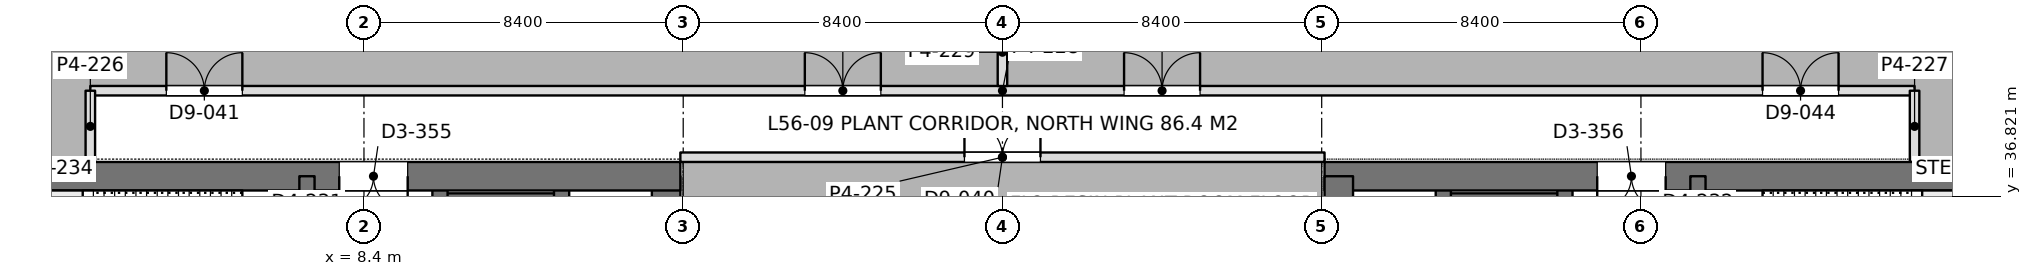
"""IFC4 building model, lengths in metres.
Left out: names, types, materials, properties, quantities, classifications, styles, units other than length and angle.
Written with IfcOpenShell. Run it as: python <this file> out.ifc"""

import sys

from ifc_helpers import new_model, si_unit, direction, frame, frame_2d, origin, place, context, subcontext, project, spatial, rectangle, extrude, element, fill, save


model = new_model("IFC4")
c1 = context("Model", 3, precision=1e-05, world=origin(), true_north=direction((0.0, 1.0)))
c2 = subcontext(c1, "Body", "Model", "MODEL_VIEW")
j1 = project(units=[si_unit("LENGTHUNIT", "METRE"), si_unit("PLANEANGLEUNIT", "RADIAN")], contexts=[c1])
p1 = place(None, origin())
s1 = spatial("IfcSite", under=j1, at=p1, CompositionType="ELEMENT")
p2 = place(p1, origin())
s2 = spatial("IfcBuilding", under=s1, at=p2, CompositionType="ELEMENT")
p3 = place(p2, frame((0.0, 0.0, 244.8)))
s3 = spatial("IfcBuildingStorey", under=s2, at=p3, CompositionType="ELEMENT", Elevation=244.8)
p4 = place(p3, frame((-1.125, 37.35, 0.0), z_axis=(0.0, 0.0, 1.0), x_axis=(1.0, 0.0, 0.0)))
e1 = element("IfcWall", 1, at=p4, inside=s3, PredefinedType="SHEAR", context=c2, shape_type="SweptSolid", body=[
    extrude(rectangle(XDim=17.85, YDim=0.75, at=frame_2d((8.925, 0.0))), origin(), (0.0, 0.0, 1.0), 5.4),
])
p5 = place(p4, frame((8.875, 0.0, 0.0)))
e2 = element("IfcOpeningElement", 2, at=p5, cuts=e1, PredefinedType="OPENING", context=c2, shape_type="SweptSolid", body=[
    extrude(rectangle(XDim=1.8, YDim=2.4, at=frame_2d((0.9, 1.2))), frame((0.0, 0.385, 0.0), z_axis=(0.0, -1.0, 0.0), x_axis=(1.0, 0.0, 0.0)), (0.0, 0.0, 1.0), 0.77),
])
p6 = place(p3, frame((16.35, 27.8, 0.0), z_axis=(0.0, 0.0, 1.0), x_axis=(0.0, 1.0, 0.0)))
e3 = element("IfcWall", 3, at=p6, inside=s3, PredefinedType="SHEAR", context=c2, shape_type="SweptSolid", body=[
    extrude(rectangle(XDim=9.55, YDim=0.75, at=frame_2d((4.775, 0.0))), origin(), (0.0, 0.0, 1.0), 5.4),
])
p7 = place(p3, frame((6.9, 13.05, 0.0), z_axis=(0.0, 0.0, 1.0), x_axis=(0.0, 1.0, 0.0)))
e4 = element("IfcWall", 4, at=p7, inside=s3, PredefinedType="SHEAR", context=c2, shape_type="SweptSolid", body=[
    extrude(rectangle(XDim=24.3, YDim=0.4, at=frame_2d((12.15, 0.0))), origin(), (0.0, 0.0, 1.0), 5.4),
])
p8 = place(p7, frame((1.3, 0.0, 0.0)))
e5 = element("IfcOpeningElement", 5, at=p8, cuts=e4, PredefinedType="OPENING", context=c2, shape_type="SweptSolid", body=[
    extrude(rectangle(XDim=1.0, YDim=2.2, at=frame_2d((0.5, 1.1))), frame((0.0, 0.21, 0.0), z_axis=(0.0, -1.0, 0.0), x_axis=(1.0, 0.0, 0.0)), (0.0, 0.0, 1.0), 0.42),
])
p9 = place(p7, frame((22.0, 0.0, 0.0)))
e6 = element("IfcOpeningElement", 6, at=p9, cuts=e4, PredefinedType="OPENING", context=c2, shape_type="SweptSolid", body=[
    extrude(rectangle(XDim=1.0, YDim=2.2, at=frame_2d((0.5, 1.1))), frame((0.0, 0.21, 0.0), z_axis=(0.0, -1.0, 0.0), x_axis=(1.0, 0.0, 0.0)), (0.0, 0.0, 1.0), 0.42),
])
p10 = place(p7, frame((5.55, 0.0, 0.0)))
e7 = element("IfcOpeningElement", 7, at=p10, cuts=e4, PredefinedType="OPENING", context=c2, shape_type="SweptSolid", body=[
    extrude(rectangle(XDim=1.0, YDim=2.2, at=frame_2d((0.5, 1.1))), frame((0.0, 0.21, 0.0), z_axis=(0.0, -1.0, 0.0), x_axis=(1.0, 0.0, 0.0)), (0.0, 0.0, 1.0), 0.42),
])
p11 = place(p7, frame((9.55, 0.0, 0.0)))
e8 = element("IfcOpeningElement", 8, at=p11, cuts=e4, PredefinedType="OPENING", context=c2, shape_type="SweptSolid", body=[
    extrude(rectangle(XDim=1.0, YDim=2.2, at=frame_2d((0.5, 1.1))), frame((0.0, 0.21, 0.0), z_axis=(0.0, -1.0, 0.0), x_axis=(1.0, 0.0, 0.0)), (0.0, 0.0, 1.0), 0.42),
])
p12 = place(p7, frame((12.8, 0.0, 0.0)))
e9 = element("IfcOpeningElement", 9, at=p12, cuts=e4, PredefinedType="OPENING", context=c2, shape_type="SweptSolid", body=[
    extrude(rectangle(XDim=1.1, YDim=2.2, at=frame_2d((0.55, 1.1))), frame((0.0, 0.21, 0.0), z_axis=(0.0, -1.0, 0.0), x_axis=(1.0, 0.0, 0.0)), (0.0, 0.0, 1.0), 0.42),
])
p13 = place(p7, frame((15.538, 0.0, 0.0)))
e10 = element("IfcOpeningElement", 10, at=p13, cuts=e4, PredefinedType="OPENING", context=c2, shape_type="SweptSolid", body=[
    extrude(rectangle(XDim=1.1, YDim=2.2, at=frame_2d((0.55, 1.1))), frame((0.0, 0.21, 0.0), z_axis=(0.0, -1.0, 0.0), x_axis=(1.0, 0.0, 0.0)), (0.0, 0.0, 1.0), 0.42),
])
p14 = place(p7, frame((18.262, 0.0, 0.0)))
e11 = element("IfcOpeningElement", 11, at=p14, cuts=e4, PredefinedType="OPENING", context=c2, shape_type="SweptSolid", body=[
    extrude(rectangle(XDim=1.1, YDim=2.2, at=frame_2d((0.55, 1.1))), frame((0.0, 0.21, 0.0), z_axis=(0.0, -1.0, 0.0), x_axis=(1.0, 0.0, 0.0)), (0.0, 0.0, 1.0), 0.42),
])
p15 = place(p3, frame((10.4, 13.05, 0.0), z_axis=(0.0, 0.0, 1.0), x_axis=(0.0, 1.0, 0.0)))
e12 = element("IfcWall", 12, at=p15, inside=s3, PredefinedType="SHEAR", context=c2, shape_type="SweptSolid", body=[
    extrude(rectangle(XDim=24.3, YDim=0.4, at=frame_2d((12.15, 0.0))), origin(), (0.0, 0.0, 1.0), 5.4),
])
p16 = place(p15, frame((15.75, 0.0, 0.0)))
e13 = element("IfcOpeningElement", 13, at=p16, cuts=e12, PredefinedType="OPENING", context=c2, shape_type="SweptSolid", body=[
    extrude(rectangle(XDim=1.1, YDim=2.2, at=frame_2d((0.55, 1.1))), frame((0.0, 0.21, 0.0), z_axis=(0.0, -1.0, 0.0), x_axis=(1.0, 0.0, 0.0)), (0.0, 0.0, 1.0), 0.42),
])
p17 = place(p15, frame((18.6, 0.0, 0.0)))
e14 = element("IfcOpeningElement", 14, at=p17, cuts=e12, PredefinedType="OPENING", context=c2, shape_type="SweptSolid", body=[
    extrude(rectangle(XDim=1.1, YDim=2.2, at=frame_2d((0.55, 1.1))), frame((0.0, 0.21, 0.0), z_axis=(0.0, -1.0, 0.0), x_axis=(1.0, 0.0, 0.0)), (0.0, 0.0, 1.0), 0.42),
])
p18 = place(p15, frame((21.45, 0.0, 0.0)))
e15 = element("IfcOpeningElement", 15, at=p18, cuts=e12, PredefinedType="OPENING", context=c2, shape_type="SweptSolid", body=[
    extrude(rectangle(XDim=1.1, YDim=2.2, at=frame_2d((0.55, 1.1))), frame((0.0, 0.21, 0.0), z_axis=(0.0, -1.0, 0.0), x_axis=(1.0, 0.0, 0.0)), (0.0, 0.0, 1.0), 0.42),
])
p19 = place(p15, frame((8.65, 0.0, 0.0)))
e16 = element("IfcOpeningElement", 16, at=p19, cuts=e12, PredefinedType="OPENING", context=c2, shape_type="SweptSolid", body=[
    extrude(rectangle(XDim=1.8, YDim=2.4, at=frame_2d((0.9, 1.2))), frame((0.0, 0.21, 0.0), z_axis=(0.0, -1.0, 0.0), x_axis=(1.0, 0.0, 0.0)), (0.0, 0.0, 1.0), 0.42),
])
p20 = place(p15, frame((1.05, 0.0, 0.0)))
e17 = element("IfcOpeningElement", 17, at=p20, cuts=e12, PredefinedType="OPENING", context=c2, shape_type="SweptSolid", body=[
    extrude(rectangle(XDim=1.8, YDim=2.4, at=frame_2d((0.9, 1.2))), frame((0.0, 0.21, 0.0), z_axis=(0.0, -1.0, 0.0), x_axis=(1.0, 0.0, 0.0)), (0.0, 0.0, 1.0), 0.42),
])
p21 = place(p3, frame((13.6, 27.925, 0.0), z_axis=(0.0, 0.0, 1.0), x_axis=(0.0, 1.0, 0.0)))
e18 = element("IfcWall", 18, at=p21, inside=s3, PredefinedType="SHEAR", context=c2, shape_type="SweptSolid", body=[
    extrude(rectangle(XDim=9.425, YDim=0.4, at=frame_2d((4.712, 0.0))), origin(), (0.0, 0.0, 1.0), 5.4),
])
p22 = place(p3, frame((10.4, 36.625, 0.0), z_axis=(0.0, 0.0, 1.0), x_axis=(1.0, 0.0, 0.0)))
e19 = element("IfcWall", 19, at=p22, inside=s3, PredefinedType="SHEAR", context=c2, shape_type="SweptSolid", body=[
    extrude(rectangle(XDim=3.2, YDim=0.55, at=frame_2d((1.6, 0.0))), origin(), (0.0, 0.0, 1.0), 5.4),
])
p23 = place(p3, frame((33.675, 37.35, 0.0), z_axis=(0.0, 0.0, 1.0), x_axis=(1.0, 0.0, 0.0)))
e20 = element("IfcWall", 20, at=p23, inside=s3, PredefinedType="SHEAR", context=c2, shape_type="SweptSolid", body=[
    extrude(rectangle(XDim=17.85, YDim=0.75, at=frame_2d((8.925, 0.0))), origin(), (0.0, 0.0, 1.0), 5.4),
])
p24 = place(p23, frame((7.175, 0.0, 0.0)))
e21 = element("IfcOpeningElement", 21, at=p24, cuts=e20, PredefinedType="OPENING", context=c2, shape_type="SweptSolid", body=[
    extrude(rectangle(XDim=1.8, YDim=2.4, at=frame_2d((0.9, 1.2))), frame((0.0, 0.385, 0.0), z_axis=(0.0, -1.0, 0.0), x_axis=(1.0, 0.0, 0.0)), (0.0, 0.0, 1.0), 0.77),
])
p25 = place(p3, frame((34.05, 27.8, 0.0), z_axis=(0.0, 0.0, 1.0), x_axis=(0.0, 1.0, 0.0)))
e22 = element("IfcWall", 22, at=p25, inside=s3, PredefinedType="SHEAR", context=c2, shape_type="SweptSolid", body=[
    extrude(rectangle(XDim=9.55, YDim=0.75, at=frame_2d((4.775, 0.0))), origin(), (0.0, 0.0, 1.0), 5.4),
])
p26 = place(p3, frame((43.5, 13.05, 0.0), z_axis=(0.0, 0.0, 1.0), x_axis=(0.0, 1.0, 0.0)))
e23 = element("IfcWall", 23, at=p26, inside=s3, PredefinedType="SHEAR", context=c2, shape_type="SweptSolid", body=[
    extrude(rectangle(XDim=24.3, YDim=0.4, at=frame_2d((12.15, 0.0))), origin(), (0.0, 0.0, 1.0), 5.4),
])
p27 = place(p26, frame((1.3, 0.0, 0.0)))
e24 = element("IfcOpeningElement", 24, at=p27, cuts=e23, PredefinedType="OPENING", context=c2, shape_type="SweptSolid", body=[
    extrude(rectangle(XDim=1.0, YDim=2.2, at=frame_2d((0.5, 1.1))), frame((0.0, 0.21, 0.0), z_axis=(0.0, -1.0, 0.0), x_axis=(1.0, 0.0, 0.0)), (0.0, 0.0, 1.0), 0.42),
])
p28 = place(p26, frame((22.0, 0.0, 0.0)))
e25 = element("IfcOpeningElement", 25, at=p28, cuts=e23, PredefinedType="OPENING", context=c2, shape_type="SweptSolid", body=[
    extrude(rectangle(XDim=1.0, YDim=2.2, at=frame_2d((0.5, 1.1))), frame((0.0, 0.21, 0.0), z_axis=(0.0, -1.0, 0.0), x_axis=(1.0, 0.0, 0.0)), (0.0, 0.0, 1.0), 0.42),
])
p29 = place(p26, frame((5.55, 0.0, 0.0)))
e26 = element("IfcOpeningElement", 26, at=p29, cuts=e23, PredefinedType="OPENING", context=c2, shape_type="SweptSolid", body=[
    extrude(rectangle(XDim=1.0, YDim=2.2, at=frame_2d((0.5, 1.1))), frame((0.0, 0.21, 0.0), z_axis=(0.0, -1.0, 0.0), x_axis=(1.0, 0.0, 0.0)), (0.0, 0.0, 1.0), 0.42),
])
p30 = place(p26, frame((9.55, 0.0, 0.0)))
e27 = element("IfcOpeningElement", 27, at=p30, cuts=e23, PredefinedType="OPENING", context=c2, shape_type="SweptSolid", body=[
    extrude(rectangle(XDim=1.0, YDim=2.2, at=frame_2d((0.5, 1.1))), frame((0.0, 0.21, 0.0), z_axis=(0.0, -1.0, 0.0), x_axis=(1.0, 0.0, 0.0)), (0.0, 0.0, 1.0), 0.42),
])
p31 = place(p26, frame((12.8, 0.0, 0.0)))
e28 = element("IfcOpeningElement", 28, at=p31, cuts=e23, PredefinedType="OPENING", context=c2, shape_type="SweptSolid", body=[
    extrude(rectangle(XDim=1.1, YDim=2.2, at=frame_2d((0.55, 1.1))), frame((0.0, 0.21, 0.0), z_axis=(0.0, -1.0, 0.0), x_axis=(1.0, 0.0, 0.0)), (0.0, 0.0, 1.0), 0.42),
])
p32 = place(p26, frame((15.538, 0.0, 0.0)))
e29 = element("IfcOpeningElement", 29, at=p32, cuts=e23, PredefinedType="OPENING", context=c2, shape_type="SweptSolid", body=[
    extrude(rectangle(XDim=1.1, YDim=2.2, at=frame_2d((0.55, 1.1))), frame((0.0, 0.21, 0.0), z_axis=(0.0, -1.0, 0.0), x_axis=(1.0, 0.0, 0.0)), (0.0, 0.0, 1.0), 0.42),
])
p33 = place(p26, frame((18.262, 0.0, 0.0)))
e30 = element("IfcOpeningElement", 30, at=p33, cuts=e23, PredefinedType="OPENING", context=c2, shape_type="SweptSolid", body=[
    extrude(rectangle(XDim=1.1, YDim=2.2, at=frame_2d((0.55, 1.1))), frame((0.0, 0.21, 0.0), z_axis=(0.0, -1.0, 0.0), x_axis=(1.0, 0.0, 0.0)), (0.0, 0.0, 1.0), 0.42),
])
p34 = place(p3, frame((40.0, 13.05, 0.0), z_axis=(0.0, 0.0, 1.0), x_axis=(0.0, 1.0, 0.0)))
e31 = element("IfcWall", 31, at=p34, inside=s3, PredefinedType="SHEAR", context=c2, shape_type="SweptSolid", body=[
    extrude(rectangle(XDim=24.3, YDim=0.4, at=frame_2d((12.15, 0.0))), origin(), (0.0, 0.0, 1.0), 5.4),
])
p35 = place(p34, frame((15.75, 0.0, 0.0)))
e32 = element("IfcOpeningElement", 32, at=p35, cuts=e31, PredefinedType="OPENING", context=c2, shape_type="SweptSolid", body=[
    extrude(rectangle(XDim=1.1, YDim=2.2, at=frame_2d((0.55, 1.1))), frame((0.0, 0.21, 0.0), z_axis=(0.0, -1.0, 0.0), x_axis=(1.0, 0.0, 0.0)), (0.0, 0.0, 1.0), 0.42),
])
p36 = place(p34, frame((18.6, 0.0, 0.0)))
e33 = element("IfcOpeningElement", 33, at=p36, cuts=e31, PredefinedType="OPENING", context=c2, shape_type="SweptSolid", body=[
    extrude(rectangle(XDim=1.1, YDim=2.2, at=frame_2d((0.55, 1.1))), frame((0.0, 0.21, 0.0), z_axis=(0.0, -1.0, 0.0), x_axis=(1.0, 0.0, 0.0)), (0.0, 0.0, 1.0), 0.42),
])
p37 = place(p34, frame((21.45, 0.0, 0.0)))
e34 = element("IfcOpeningElement", 34, at=p37, cuts=e31, PredefinedType="OPENING", context=c2, shape_type="SweptSolid", body=[
    extrude(rectangle(XDim=1.1, YDim=2.2, at=frame_2d((0.55, 1.1))), frame((0.0, 0.21, 0.0), z_axis=(0.0, -1.0, 0.0), x_axis=(1.0, 0.0, 0.0)), (0.0, 0.0, 1.0), 0.42),
])
p38 = place(p34, frame((8.65, 0.0, 0.0)))
e35 = element("IfcOpeningElement", 35, at=p38, cuts=e31, PredefinedType="OPENING", context=c2, shape_type="SweptSolid", body=[
    extrude(rectangle(XDim=1.8, YDim=2.4, at=frame_2d((0.9, 1.2))), frame((0.0, 0.21, 0.0), z_axis=(0.0, -1.0, 0.0), x_axis=(1.0, 0.0, 0.0)), (0.0, 0.0, 1.0), 0.42),
])
p39 = place(p34, frame((1.05, 0.0, 0.0)))
e36 = element("IfcOpeningElement", 36, at=p39, cuts=e31, PredefinedType="OPENING", context=c2, shape_type="SweptSolid", body=[
    extrude(rectangle(XDim=1.8, YDim=2.4, at=frame_2d((0.9, 1.2))), frame((0.0, 0.21, 0.0), z_axis=(0.0, -1.0, 0.0), x_axis=(1.0, 0.0, 0.0)), (0.0, 0.0, 1.0), 0.42),
])
p40 = place(p3, frame((36.8, 27.925, 0.0), z_axis=(0.0, 0.0, 1.0), x_axis=(0.0, 1.0, 0.0)))
e37 = element("IfcWall", 37, at=p40, inside=s3, PredefinedType="SHEAR", context=c2, shape_type="SweptSolid", body=[
    extrude(rectangle(XDim=9.425, YDim=0.4, at=frame_2d((4.712, 0.0))), origin(), (0.0, 0.0, 1.0), 5.4),
])
p41 = place(p3, frame((40.0, 36.625, 0.0), z_axis=(0.0, 0.0, 1.0), x_axis=(-1.0, 0.0, 0.0)))
e38 = element("IfcWall", 38, at=p41, inside=s3, PredefinedType="SHEAR", context=c2, shape_type="SweptSolid", body=[
    extrude(rectangle(XDim=3.2, YDim=0.55, at=frame_2d((1.6, 0.0))), origin(), (0.0, 0.0, 1.0), 5.4),
])
p42 = place(p3, frame((1.2, 39.6, 0.0), z_axis=(0.0, 0.0, 1.0), x_axis=(1.0, 0.0, 0.0)))
e39 = element("IfcWall", 39, at=p42, inside=s3, PredefinedType="PARTITIONING", context=c2, shape_type="SweptSolid", body=[
    extrude(rectangle(XDim=48.0, YDim=0.25, at=frame_2d((24.0, 0.0))), origin(), (0.0, 0.0, 1.0), 4.7),
])
p43 = place(p42, frame((2.0, 0.0, 0.0)))
e40 = element("IfcOpeningElement", 40, at=p43, cuts=e39, PredefinedType="OPENING", context=c2, shape_type="SweptSolid", body=[
    extrude(rectangle(XDim=2.0, YDim=2.4, at=frame_2d((1.0, 1.2))), frame((0.0, 0.135, 0.0), z_axis=(0.0, -1.0, 0.0), x_axis=(1.0, 0.0, 0.0)), (0.0, 0.0, 1.0), 0.27),
])
p44 = place(p42, frame((18.8, 0.0, 0.0)))
e41 = element("IfcOpeningElement", 41, at=p44, cuts=e39, PredefinedType="OPENING", context=c2, shape_type="SweptSolid", body=[
    extrude(rectangle(XDim=2.0, YDim=2.4, at=frame_2d((1.0, 1.2))), frame((0.0, 0.135, 0.0), z_axis=(0.0, -1.0, 0.0), x_axis=(1.0, 0.0, 0.0)), (0.0, 0.0, 1.0), 0.27),
])
p45 = place(p42, frame((27.2, 0.0, 0.0)))
e42 = element("IfcOpeningElement", 42, at=p45, cuts=e39, PredefinedType="OPENING", context=c2, shape_type="SweptSolid", body=[
    extrude(rectangle(XDim=2.0, YDim=2.4, at=frame_2d((1.0, 1.2))), frame((0.0, 0.135, 0.0), z_axis=(0.0, -1.0, 0.0), x_axis=(1.0, 0.0, 0.0)), (0.0, 0.0, 1.0), 0.27),
])
p46 = place(p42, frame((44.0, 0.0, 0.0)))
e43 = element("IfcOpeningElement", 43, at=p46, cuts=e39, PredefinedType="OPENING", context=c2, shape_type="SweptSolid", body=[
    extrude(rectangle(XDim=2.0, YDim=2.4, at=frame_2d((1.0, 1.2))), frame((0.0, 0.135, 0.0), z_axis=(0.0, -1.0, 0.0), x_axis=(1.0, 0.0, 0.0)), (0.0, 0.0, 1.0), 0.27),
])
for number, where, z_axis, x_axis in (
    (44, (1.2, 37.724, 0.0), (0.0, 0.0, 1.0), (0.0, 1.0, 0.0)),
    (45, (49.2, 37.724, 0.0), (0.0, 0.0, 1.0), (0.0, 1.0, 0.0)),
):
    element("IfcWall", number, at=place(p3, frame(where, z_axis=z_axis, x_axis=x_axis)), inside=s3, PredefinedType="PARTITIONING", context=c2, shape_type="SweptSolid", body=[
        extrude(rectangle(XDim=1.876, YDim=0.25, at=frame_2d((0.938, 0.0))), origin(), (0.0, 0.0, 1.0), 5.25),
    ])
p47 = place(p3, frame((25.2, 39.724, 0.0), z_axis=(0.0, 0.0, 1.0), x_axis=(0.0, 1.0, 0.0)))
e46 = element("IfcWall", 46, at=p47, inside=s3, PredefinedType="PARTITIONING", context=c2, shape_type="SweptSolid", body=[
    extrude(rectangle(XDim=1.777, YDim=0.25, at=frame_2d((0.888, 0.0))), origin(), (0.0, 0.0, 1.0), 4.7),
])
p48 = place(p3, frame((16.725, 37.85, 0.0), z_axis=(0.0, 0.0, 1.0), x_axis=(1.0, 0.0, 0.0)))
e47 = element("IfcWall", 47, at=p48, inside=s3, PredefinedType="PARTITIONING", context=c2, shape_type="SweptSolid", body=[
    extrude(rectangle(XDim=16.95, YDim=0.25, at=frame_2d((8.475, 0.0))), origin(), (0.0, 0.0, 1.0), 4.7),
])
p49 = place(p48, frame((7.475, 0.0, 0.0)))
e48 = element("IfcOpeningElement", 48, at=p49, cuts=e47, PredefinedType="OPENING", context=c2, shape_type="SweptSolid", body=[
    extrude(rectangle(XDim=2.0, YDim=2.4, at=frame_2d((1.0, 1.2))), frame((0.0, 0.135, 0.0), z_axis=(0.0, -1.0, 0.0), x_axis=(1.0, 0.0, 0.0)), (0.0, 0.0, 1.0), 0.27),
])
p50 = place(p5, frame((1.8, 0.0, 0.0), z_axis=(0.0, 0.0, 1.0), x_axis=(-1.0, 0.0, 0.0)))
e49 = element("IfcDoor", 49, at=p50, inside=s3, OperationType="DOUBLE_DOOR_SINGLE_SWING", PredefinedType="DOOR", context=c2, shape_type="SweptSolid", body=[
    extrude(rectangle(XDim=1.8, YDim=2.4, at=frame_2d((0.9, 1.2))), frame((0.0, 0.025, 0.0), z_axis=(0.0, -1.0, 0.0), x_axis=(1.0, 0.0, 0.0)), (0.0, 0.0, 1.0), 0.05),
])
fill(e2, e49)
p51 = place(p24, frame((1.8, 0.0, 0.0), z_axis=(0.0, 0.0, 1.0), x_axis=(-1.0, 0.0, 0.0)))
e50 = element("IfcDoor", 50, at=p51, inside=s3, OperationType="DOUBLE_DOOR_SINGLE_SWING", PredefinedType="DOOR", context=c2, shape_type="SweptSolid", body=[
    extrude(rectangle(XDim=1.8, YDim=2.4, at=frame_2d((0.9, 1.2))), frame((0.0, 0.025, 0.0), z_axis=(0.0, -1.0, 0.0), x_axis=(1.0, 0.0, 0.0)), (0.0, 0.0, 1.0), 0.05),
])
fill(e21, e50)
p52 = place(p43, origin())
e51 = element("IfcDoor", 51, at=p52, inside=s3, OperationType="DOUBLE_DOOR_SINGLE_SWING", PredefinedType="DOOR", context=c2, shape_type="SweptSolid", body=[
    extrude(rectangle(XDim=2.0, YDim=2.4, at=frame_2d((1.0, 1.2))), frame((0.0, 0.025, 0.0), z_axis=(0.0, -1.0, 0.0), x_axis=(1.0, 0.0, 0.0)), (0.0, 0.0, 1.0), 0.05),
])
fill(e40, e51)
p53 = place(p44, origin())
e52 = element("IfcDoor", 52, at=p53, inside=s3, OperationType="DOUBLE_DOOR_SINGLE_SWING", PredefinedType="DOOR", context=c2, shape_type="SweptSolid", body=[
    extrude(rectangle(XDim=2.0, YDim=2.4, at=frame_2d((1.0, 1.2))), frame((0.0, 0.025, 0.0), z_axis=(0.0, -1.0, 0.0), x_axis=(1.0, 0.0, 0.0)), (0.0, 0.0, 1.0), 0.05),
])
fill(e41, e52)
p54 = place(p45, origin())
e53 = element("IfcDoor", 53, at=p54, inside=s3, OperationType="DOUBLE_DOOR_SINGLE_SWING", PredefinedType="DOOR", context=c2, shape_type="SweptSolid", body=[
    extrude(rectangle(XDim=2.0, YDim=2.4, at=frame_2d((1.0, 1.2))), frame((0.0, 0.025, 0.0), z_axis=(0.0, -1.0, 0.0), x_axis=(1.0, 0.0, 0.0)), (0.0, 0.0, 1.0), 0.05),
])
fill(e42, e53)
p55 = place(p46, origin())
e54 = element("IfcDoor", 54, at=p55, inside=s3, OperationType="DOUBLE_DOOR_SINGLE_SWING", PredefinedType="DOOR", context=c2, shape_type="SweptSolid", body=[
    extrude(rectangle(XDim=2.0, YDim=2.4, at=frame_2d((1.0, 1.2))), frame((0.0, 0.025, 0.0), z_axis=(0.0, -1.0, 0.0), x_axis=(1.0, 0.0, 0.0)), (0.0, 0.0, 1.0), 0.05),
])
fill(e43, e54)
p56 = place(p49, origin())
e55 = element("IfcDoor", 55, at=p56, inside=s3, OperationType="DOUBLE_DOOR_SINGLE_SWING", PredefinedType="DOOR", context=c2, shape_type="SweptSolid", body=[
    extrude(rectangle(XDim=2.0, YDim=2.4, at=frame_2d((1.0, 1.2))), frame((0.0, 0.025, 0.0), z_axis=(0.0, -1.0, 0.0), x_axis=(1.0, 0.0, 0.0)), (0.0, 0.0, 1.0), 0.05),
])
fill(e48, e55)
save(model, sys.argv[1])
